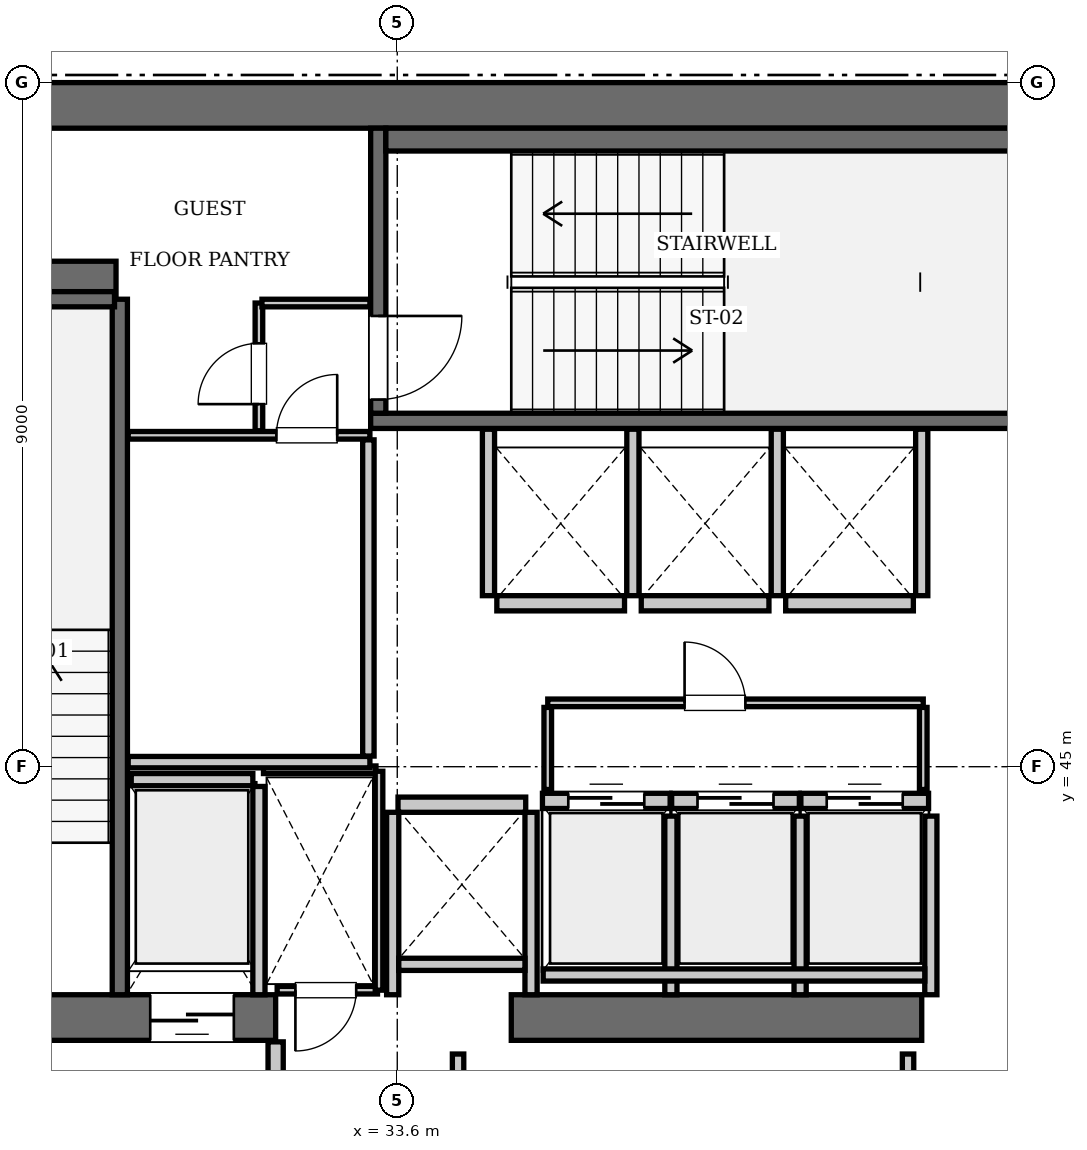
"""IFC4 building model, lengths in metres.
Left out: names, types, materials, properties, quantities, classifications, styles, units other than length and angle.
Written with IfcOpenShell. Run it as: python <this file> out.ifc"""

import sys

from ifc_helpers import new_model, si_unit, direction, frame, frame_2d, origin, place, context, subcontext, project, spatial, rectangle, extrude, element, fill, save


model = new_model("IFC4")
c1 = context("Model", 3, precision=1e-05, world=origin(), true_north=direction((0.0, 1.0)))
c2 = subcontext(c1, "Body", "Model", "MODEL_VIEW")
j1 = project(units=[si_unit("LENGTHUNIT", "METRE"), si_unit("PLANEANGLEUNIT", "RADIAN")], contexts=[c1])
p1 = place(None, origin())
s1 = spatial("IfcSite", under=j1, at=p1, CompositionType="ELEMENT")
p2 = place(p1, origin())
s2 = spatial("IfcBuilding", under=s1, at=p2, CompositionType="ELEMENT")
p3 = place(p2, frame((0.0, 0.0, 247.1)))
s3 = spatial("IfcBuildingStorey", under=s2, at=p3, CompositionType="ELEMENT", Elevation=247.1)
p4 = place(p3, frame((25.2, 53.7, 0.0), z_axis=(0.0, 0.0, 1.0), x_axis=(1.0, 0.0, 0.0)))
e1 = element("IfcWall", 1, at=p4, inside=s3, PredefinedType="SHEAR", context=c2, shape_type="SweptSolid", body=[
    extrude(rectangle(XDim=25.2, YDim=0.6, at=frame_2d((12.6, 0.0))), origin(), (0.0, 0.0, 1.0), 3.85),
])
p5 = place(p3, frame((25.2, 41.7, 0.0), z_axis=(0.0, 0.0, 1.0), x_axis=(1.0, 0.0, 0.0)))
e2 = element("IfcWall", 2, at=p5, inside=s3, PredefinedType="SHEAR", context=c2, shape_type="SweptSolid", body=[
    extrude(rectangle(XDim=6.8, YDim=0.6, at=frame_2d((3.4, 0.0))), origin(), (0.0, 0.0, 1.0), 3.85),
])
p6 = place(p5, frame((1.65, 0.0, 0.0)))
e3 = element("IfcOpeningElement", 3, at=p6, cuts=e2, PredefinedType="OPENING", context=c2, shape_type="SweptSolid", body=[
    extrude(rectangle(XDim=1.15, YDim=2.15, at=frame_2d((0.575, 1.075))), frame((0.0, 0.31, 0.0), z_axis=(0.0, -1.0, 0.0), x_axis=(1.0, 0.0, 0.0)), (0.0, 0.0, 1.0), 0.62),
])
p7 = place(p5, frame((5.15, 0.0, 0.0)))
e4 = element("IfcOpeningElement", 4, at=p7, cuts=e2, PredefinedType="OPENING", context=c2, shape_type="SweptSolid", body=[
    extrude(rectangle(XDim=1.1, YDim=2.2, at=frame_2d((0.55, 1.1))), frame((0.0, 0.31, 0.0), z_axis=(0.0, -1.0, 0.0), x_axis=(1.0, 0.0, 0.0)), (0.0, 0.0, 1.0), 0.62),
])
p8 = place(p3, frame((35.1, 41.7, 0.0), z_axis=(0.0, 0.0, 1.0), x_axis=(1.0, 0.0, 0.0)))
e5 = element("IfcWall", 5, at=p8, inside=s3, PredefinedType="SHEAR", context=c2, shape_type="SweptSolid", body=[
    extrude(rectangle(XDim=5.4, YDim=0.6, at=frame_2d((2.7, 0.0))), origin(), (0.0, 0.0, 1.0), 3.85),
])
p9 = place(p3, frame((25.8, 51.4, 0.0), z_axis=(0.0, 0.0, 1.0), x_axis=(1.0, 0.0, 0.0)))
e6 = element("IfcWall", 6, at=p9, inside=s3, PredefinedType="SHEAR", context=c2, shape_type="SweptSolid", body=[
    extrude(rectangle(XDim=4.1, YDim=0.5, at=frame_2d((2.05, 0.0))), origin(), (0.0, 0.0, 1.0), 3.85),
])
p10 = place(p3, frame((29.95, 42.0, 0.0), z_axis=(0.0, 0.0, 1.0), x_axis=(0.0, 1.0, 0.0)))
e7 = element("IfcWall", 7, at=p10, inside=s3, PredefinedType="SOLIDWALL", context=c2, shape_type="SweptSolid", body=[
    extrude(rectangle(XDim=9.15, YDim=0.2, at=frame_2d((4.575, 0.0))), origin(), (0.0, 0.0, 1.0), 3.61),
])
p11 = place(p3, frame((26.38, 51.15, 0.0), z_axis=(0.0, 0.0, 1.0), x_axis=(1.0, 0.0, 0.0)))
e8 = element("IfcWall", 8, at=p11, inside=s3, PredefinedType="SOLIDWALL", context=c2, shape_type="SweptSolid", body=[
    extrude(rectangle(XDim=3.5, YDim=0.2, at=frame_2d((1.75, 0.0))), origin(), (0.0, 0.0, 1.0), 3.61),
])
p12 = place(p3, frame((33.25, 49.55, 0.0), z_axis=(0.0, 0.0, 1.0), x_axis=(1.0, 0.0, 0.0)))
e9 = element("IfcWall", 9, at=p12, inside=s3, PredefinedType="SOLIDWALL", context=c2, shape_type="SweptSolid", body=[
    extrude(rectangle(XDim=9.1, YDim=0.2, at=frame_2d((4.55, 0.0))), origin(), (0.0, 0.0, 1.0), 3.61),
])
p13 = place(p3, frame((33.35, 49.65, 0.0), z_axis=(0.0, 0.0, 1.0), x_axis=(0.0, 1.0, 0.0)))
e10 = element("IfcWall", 10, at=p13, inside=s3, PredefinedType="SOLIDWALL", context=c2, shape_type="SweptSolid", body=[
    extrude(rectangle(XDim=3.75, YDim=0.2, at=frame_2d((1.875, 0.0))), origin(), (0.0, 0.0, 1.0), 3.61),
])
p14 = place(p13, frame((0.18, 0.0, 0.0)))
e11 = element("IfcOpeningElement", 11, at=p14, cuts=e10, PredefinedType="OPENING", context=c2, shape_type="SweptSolid", body=[
    extrude(rectangle(XDim=1.1, YDim=2.15, at=frame_2d((0.55, 1.075))), frame((0.0, 0.11, 0.0), z_axis=(0.0, -1.0, 0.0), x_axis=(1.0, 0.0, 0.0)), (0.0, 0.0, 1.0), 0.22),
])
p15 = place(p3, frame((33.45, 53.25, 0.0), z_axis=(0.0, 0.0, 1.0), x_axis=(1.0, 0.0, 0.0)))
e12 = element("IfcWall", 12, at=p15, inside=s3, PredefinedType="SOLIDWALL", context=c2, shape_type="SweptSolid", body=[
    extrude(rectangle(XDim=8.7, YDim=0.3, at=frame_2d((4.35, 0.0))), origin(), (0.0, 0.0, 1.0), 3.61),
])
p16 = place(p3, frame((35.51, 44.55, 0.0), z_axis=(0.0, 0.0, 1.0), x_axis=(1.0, 0.0, 0.0)))
e13 = element("IfcWall", 13, at=p16, inside=s3, PredefinedType="SOLIDWALL", context=c2, shape_type="SweptSolid", body=[
    extrude(rectangle(XDim=1.68, YDim=0.2, at=frame_2d((0.84, 0.0))), origin(), (0.0, 0.0, 1.0), 3.61),
])
p17 = place(p16, frame((0.34, 0.0, 0.0)))
e14 = element("IfcOpeningElement", 14, at=p17, cuts=e13, PredefinedType="OPENING", context=c2, shape_type="SweptSolid", body=[
    extrude(rectangle(XDim=1.0, YDim=2.15, at=frame_2d((0.5, 1.075))), frame((0.0, 0.11, 0.0), z_axis=(0.0, -1.0, 0.0), x_axis=(1.0, 0.0, 0.0)), (0.0, 0.0, 1.0), 0.22),
])
p18 = place(p3, frame((37.21, 44.55, 0.0), z_axis=(0.0, 0.0, 1.0), x_axis=(1.0, 0.0, 0.0)))
e15 = element("IfcWall", 15, at=p18, inside=s3, PredefinedType="SOLIDWALL", context=c2, shape_type="SweptSolid", body=[
    extrude(rectangle(XDim=1.68, YDim=0.2, at=frame_2d((0.84, 0.0))), origin(), (0.0, 0.0, 1.0), 3.61),
])
p19 = place(p18, frame((0.34, 0.0, 0.0)))
e16 = element("IfcOpeningElement", 16, at=p19, cuts=e15, PredefinedType="OPENING", context=c2, shape_type="SweptSolid", body=[
    extrude(rectangle(XDim=1.0, YDim=2.15, at=frame_2d((0.5, 1.075))), frame((0.0, 0.11, 0.0), z_axis=(0.0, -1.0, 0.0), x_axis=(1.0, 0.0, 0.0)), (0.0, 0.0, 1.0), 0.22),
])
p20 = place(p3, frame((38.91, 44.55, 0.0), z_axis=(0.0, 0.0, 1.0), x_axis=(1.0, 0.0, 0.0)))
e17 = element("IfcWall", 17, at=p20, inside=s3, PredefinedType="SOLIDWALL", context=c2, shape_type="SweptSolid", body=[
    extrude(rectangle(XDim=1.68, YDim=0.2, at=frame_2d((0.84, 0.0))), origin(), (0.0, 0.0, 1.0), 3.61),
])
p21 = place(p20, frame((0.34, 0.0, 0.0)))
e18 = element("IfcOpeningElement", 18, at=p21, cuts=e17, PredefinedType="OPENING", context=c2, shape_type="SweptSolid", body=[
    extrude(rectangle(XDim=1.0, YDim=2.15, at=frame_2d((0.5, 1.075))), frame((0.0, 0.11, 0.0), z_axis=(0.0, -1.0, 0.0), x_axis=(1.0, 0.0, 0.0)), (0.0, 0.0, 1.0), 0.22),
])
p22 = place(p3, frame((34.91, 47.15, 0.0), z_axis=(0.0, 0.0, 1.0), x_axis=(1.0, 0.0, 0.0)))
e19 = element("IfcWall", 19, at=p22, inside=s3, PredefinedType="SOLIDWALL", context=c2, shape_type="SweptSolid", body=[
    extrude(rectangle(XDim=1.68, YDim=0.2, at=frame_2d((0.84, 0.0))), origin(), (0.0, 0.0, 1.0), 3.61),
])
for number, where, z_axis, x_axis in (
    (20, (36.81, 47.15, 0.0), (0.0, 0.0, 1.0), (1.0, 0.0, 0.0)),
    (21, (38.71, 47.15, 0.0), (0.0, 0.0, 1.0), (1.0, 0.0, 0.0)),
    (22, (33.61, 44.5, 0.0), (0.0, 0.0, 1.0), (1.0, 0.0, 0.0)),
):
    element("IfcWall", number, at=place(p3, frame(where, z_axis=z_axis, x_axis=x_axis)), inside=s3, PredefinedType="SOLIDWALL", context=c2, shape_type="SweptSolid", body=[
        extrude(rectangle(XDim=1.68, YDim=0.2, at=frame_2d((0.84, 0.0))), origin(), (0.0, 0.0, 1.0), 3.61),
    ])
p23 = place(p3, frame((30.1, 44.83, 0.0), z_axis=(0.0, 0.0, 1.0), x_axis=(1.0, 0.0, 0.0)))
e23 = element("IfcWall", 23, at=p23, inside=s3, PredefinedType="SOLIDWALL", context=c2, shape_type="SweptSolid", body=[
    extrude(rectangle(XDim=1.6, YDim=0.16, at=frame_2d((0.8, 0.0))), origin(), (0.0, 0.0, 1.0), 3.61),
])
p24 = place(p3, frame((31.78, 42.0, 0.0), z_axis=(0.0, 0.0, 1.0), x_axis=(0.0, 1.0, 0.0)))
e24 = element("IfcWall", 24, at=p24, inside=s3, PredefinedType="SOLIDWALL", context=c2, shape_type="SweptSolid", body=[
    extrude(rectangle(XDim=2.74, YDim=0.16, at=frame_2d((1.37, 0.0))), origin(), (0.0, 0.0, 1.0), 3.61),
])
for number, where, z_axis, x_axis in (
    (25, (37.2, 42.0, 0.0), (0.0, 0.0, 1.0), (0.0, 1.0, 0.0)),
    (26, (38.9, 42.0, 0.0), (0.0, 0.0, 1.0), (0.0, 1.0, 0.0)),
    (27, (40.62, 42.0, 0.0), (0.0, 0.0, 1.0), (0.0, 1.0, 0.0)),
):
    element("IfcWall", number, at=place(p3, frame(where, z_axis=z_axis, x_axis=x_axis)), inside=s3, PredefinedType="SOLIDWALL", context=c2, shape_type="SweptSolid", body=[
        extrude(rectangle(XDim=2.35, YDim=0.16, at=frame_2d((1.175, 0.0))), origin(), (0.0, 0.0, 1.0), 3.61),
    ])
p25 = place(p3, frame((35.52, 42.26, 0.0), z_axis=(0.0, 0.0, 1.0), x_axis=(1.0, 0.0, 0.0)))
e28 = element("IfcWall", 28, at=p25, inside=s3, PredefinedType="SOLIDWALL", context=c2, shape_type="SweptSolid", body=[
    extrude(rectangle(XDim=5.02, YDim=0.16, at=frame_2d((2.51, 0.0))), origin(), (0.0, 0.0, 1.0), 3.61),
])
for number, where, z_axis, x_axis in (
    (29, (34.8, 47.25, 0.0), (0.0, 0.0, 1.0), (0.0, 1.0, 0.0)),
    (30, (36.7, 47.25, 0.0), (0.0, 0.0, 1.0), (0.0, 1.0, 0.0)),
    (31, (38.6, 47.25, 0.0), (0.0, 0.0, 1.0), (0.0, 1.0, 0.0)),
    (32, (40.5, 47.25, 0.0), (0.0, 0.0, 1.0), (0.0, 1.0, 0.0)),
):
    element("IfcWall", number, at=place(p3, frame(where, z_axis=z_axis, x_axis=x_axis)), inside=s3, PredefinedType="SOLIDWALL", context=c2, shape_type="SweptSolid", body=[
        extrude(rectangle(XDim=2.19, YDim=0.16, at=frame_2d((1.095, 0.0))), origin(), (0.0, 0.0, 1.0), 3.61),
    ])
for number, where, z_axis, x_axis in (
    (33, (33.54, 42.0, 0.0), (0.0, 0.0, 1.0), (0.0, 1.0, 0.0)),
    (34, (35.36, 42.0, 0.0), (0.0, 0.0, 1.0), (0.0, 1.0, 0.0)),
):
    element("IfcWall", number, at=place(p3, frame(where, z_axis=z_axis, x_axis=x_axis)), inside=s3, PredefinedType="SOLIDWALL", context=c2, shape_type="SweptSolid", body=[
        extrude(rectangle(XDim=2.4, YDim=0.16, at=frame_2d((1.2, 0.0))), origin(), (0.0, 0.0, 1.0), 3.61),
    ])
p26 = place(p3, frame((33.62, 42.4, 0.0), z_axis=(0.0, 0.0, 1.0), x_axis=(1.0, 0.0, 0.0)))
e35 = element("IfcWall", 35, at=p26, inside=s3, PredefinedType="SOLIDWALL", context=c2, shape_type="SweptSolid", body=[
    extrude(rectangle(XDim=1.66, YDim=0.16, at=frame_2d((0.83, 0.0))), origin(), (0.0, 0.0, 1.0), 3.61),
])
p27 = place(p3, frame((32.0, 38.31, 0.0), z_axis=(0.0, 0.0, 1.0), x_axis=(0.0, 1.0, 0.0)))
e36 = element("IfcWall", 36, at=p27, inside=s3, PredefinedType="PARTITIONING", context=c2, shape_type="SweptSolid", body=[
    extrude(rectangle(XDim=3.07, YDim=0.2, at=frame_2d((1.535, 0.0))), origin(), (0.0, 0.0, 1.0), 3.61),
])
p28 = place(p3, frame((32.02, 42.06, 0.0), z_axis=(0.0, 0.0, 1.0), x_axis=(1.0, 0.0, 0.0)))
e37 = element("IfcWall", 37, at=p28, inside=s3, PredefinedType="PARTITIONING", context=c2, shape_type="SweptSolid", body=[
    extrude(rectangle(XDim=1.32, YDim=0.1, at=frame_2d((0.66, 0.0))), origin(), (0.0, 0.0, 1.0), 3.61),
])
p29 = place(p28, frame((0.24, 0.0, 0.0)))
e38 = element("IfcOpeningElement", 38, at=p29, cuts=e37, PredefinedType="OPENING", context=c2, shape_type="SweptSolid", body=[
    extrude(rectangle(XDim=0.8, YDim=2.05, at=frame_2d((0.4, 1.025))), frame((0.0, 0.06, 0.0), z_axis=(0.0, -1.0, 0.0), x_axis=(1.0, 0.0, 0.0)), (0.0, 0.0, 1.0), 0.12),
])
p30 = place(p3, frame((31.84, 44.96, 0.0), z_axis=(0.0, 0.0, 1.0), x_axis=(1.0, 0.0, 0.0)))
e39 = element("IfcWall", 39, at=p30, inside=s3, PredefinedType="PARTITIONING", context=c2, shape_type="SweptSolid", body=[
    extrude(rectangle(XDim=1.48, YDim=0.1, at=frame_2d((0.74, 0.0))), origin(), (0.0, 0.0, 1.0), 3.61),
])
p31 = place(p3, frame((33.36, 42.06, 0.0), z_axis=(0.0, 0.0, 1.0), x_axis=(0.0, 1.0, 0.0)))
e40 = element("IfcWall", 40, at=p31, inside=s3, PredefinedType="PARTITIONING", context=c2, shape_type="SweptSolid", body=[
    extrude(rectangle(XDim=2.88, YDim=0.1, at=frame_2d((1.44, 0.0))), origin(), (0.0, 0.0, 1.0), 3.61),
])
p32 = place(p3, frame((35.58, 45.84, 0.0), z_axis=(0.0, 0.0, 1.0), x_axis=(1.0, 0.0, 0.0)))
e41 = element("IfcWall", 41, at=p32, inside=s3, PredefinedType="PARTITIONING", context=c2, shape_type="SweptSolid", body=[
    extrude(rectangle(XDim=4.94, YDim=0.1, at=frame_2d((2.47, 0.0))), origin(), (0.0, 0.0, 1.0), 3.61),
])
p33 = place(p32, frame((1.8, 0.0, 0.0)))
e42 = element("IfcOpeningElement", 42, at=p33, cuts=e41, PredefinedType="OPENING", context=c2, shape_type="SweptSolid", body=[
    extrude(rectangle(XDim=0.8, YDim=2.05, at=frame_2d((0.4, 1.025))), frame((0.0, 0.06, 0.0), z_axis=(0.0, -1.0, 0.0), x_axis=(1.0, 0.0, 0.0)), (0.0, 0.0, 1.0), 0.12),
])
for number, where, z_axis, x_axis in (
    (43, (35.58, 44.7, 0.0), (0.0, 0.0, 1.0), (0.0, 1.0, 0.0)),
    (44, (40.52, 44.7, 0.0), (0.0, 0.0, 1.0), (0.0, 1.0, 0.0)),
):
    element("IfcWall", number, at=place(p3, frame(where, z_axis=z_axis, x_axis=x_axis)), inside=s3, PredefinedType="PARTITIONING", context=c2, shape_type="SweptSolid", body=[
        extrude(rectangle(XDim=1.08, YDim=0.1, at=frame_2d((0.54, 0.0))), origin(), (0.0, 0.0, 1.0), 3.61),
    ])
p34 = place(p3, frame((30.06, 45.06, 0.0), z_axis=(0.0, 0.0, 1.0), x_axis=(1.0, 0.0, 0.0)))
e45 = element("IfcWall", 45, at=p34, inside=s3, PredefinedType="PARTITIONING", context=c2, shape_type="SweptSolid", body=[
    extrude(rectangle(XDim=3.18, YDim=0.15, at=frame_2d((1.59, 0.0))), origin(), (0.0, 0.0, 1.0), 3.61),
])
p35 = place(p3, frame((33.22, 45.14, 0.0), z_axis=(0.0, 0.0, 1.0), x_axis=(0.0, 1.0, 0.0)))
e46 = element("IfcWall", 46, at=p35, inside=s3, PredefinedType="PARTITIONING", context=c2, shape_type="SweptSolid", body=[
    extrude(rectangle(XDim=4.16, YDim=0.15, at=frame_2d((2.08, 0.0))), origin(), (0.0, 0.0, 1.0), 3.61),
])
p36 = place(p3, frame((30.06, 49.36, 0.0), z_axis=(0.0, 0.0, 1.0), x_axis=(1.0, 0.0, 0.0)))
e47 = element("IfcWall", 47, at=p36, inside=s3, PredefinedType="PARTITIONING", context=c2, shape_type="SweptSolid", body=[
    extrude(rectangle(XDim=3.18, YDim=0.1, at=frame_2d((1.59, 0.0))), origin(), (0.0, 0.0, 1.0), 3.61),
])
p37 = place(p36, frame((1.95, 0.0, 0.0)))
e48 = element("IfcOpeningElement", 48, at=p37, cuts=e47, PredefinedType="OPENING", context=c2, shape_type="SweptSolid", body=[
    extrude(rectangle(XDim=0.8, YDim=2.05, at=frame_2d((0.4, 1.025))), frame((0.0, 0.06, 0.0), z_axis=(0.0, -1.0, 0.0), x_axis=(1.0, 0.0, 0.0)), (0.0, 0.0, 1.0), 0.12),
])
p38 = place(p3, frame((31.78, 49.42, 0.0), z_axis=(0.0, 0.0, 1.0), x_axis=(0.0, 1.0, 0.0)))
e49 = element("IfcWall", 49, at=p38, inside=s3, PredefinedType="PARTITIONING", context=c2, shape_type="SweptSolid", body=[
    extrude(rectangle(XDim=1.68, YDim=0.1, at=frame_2d((0.84, 0.0))), origin(), (0.0, 0.0, 1.0), 3.61),
])
p39 = place(p38, frame((0.35, 0.0, 0.0)))
e50 = element("IfcOpeningElement", 50, at=p39, cuts=e49, PredefinedType="OPENING", context=c2, shape_type="SweptSolid", body=[
    extrude(rectangle(XDim=0.8, YDim=2.05, at=frame_2d((0.4, 1.025))), frame((0.0, 0.06, 0.0), z_axis=(0.0, -1.0, 0.0), x_axis=(1.0, 0.0, 0.0)), (0.0, 0.0, 1.0), 0.12),
])
p40 = place(p3, frame((31.82, 51.1, 0.0), z_axis=(0.0, 0.0, 1.0), x_axis=(1.0, 0.0, 0.0)))
e51 = element("IfcWall", 51, at=p40, inside=s3, PredefinedType="PARTITIONING", context=c2, shape_type="SweptSolid", body=[
    extrude(rectangle(XDim=1.42, YDim=0.1, at=frame_2d((0.71, 0.0))), origin(), (0.0, 0.0, 1.0), 3.61),
])
for number, where, z_axis, x_axis in (
    (52, (34.4, 38.38, 0.0), (0.0, 0.0, 1.0), (0.0, 1.0, 0.0)),
    (53, (40.32, 38.38, 0.0), (0.0, 0.0, 1.0), (0.0, 1.0, 0.0)),
):
    element("IfcWall", number, at=place(p3, frame(where, z_axis=z_axis, x_axis=x_axis)), inside=s3, PredefinedType="PARTITIONING", context=c2, shape_type="SweptSolid", body=[
        extrude(rectangle(XDim=2.84, YDim=0.15, at=frame_2d((1.42, 0.0))), origin(), (0.0, 0.0, 1.0), 3.61),
    ])
p41 = place(p14, frame((1.1, 0.0, 0.0), z_axis=(0.0, 0.0, 1.0), x_axis=(-1.0, 0.0, 0.0)))
e54 = element("IfcDoor", 54, at=p41, inside=s3, OperationType="SINGLE_SWING_LEFT", PredefinedType="DOOR", context=c2, shape_type="SweptSolid", body=[
    extrude(rectangle(XDim=1.1, YDim=2.15, at=frame_2d((0.55, 1.075))), frame((0.0, 0.025, 0.0), z_axis=(0.0, -1.0, 0.0), x_axis=(1.0, 0.0, 0.0)), (0.0, 0.0, 1.0), 0.05),
])
fill(e11, e54)
p42 = place(p17, origin())
e55 = element("IfcDoor", 55, at=p42, inside=s3, OperationType="SLIDING_TO_LEFT", PredefinedType="DOOR", context=c2, shape_type="SweptSolid", body=[
    extrude(rectangle(XDim=1.0, YDim=2.15, at=frame_2d((0.5, 1.075))), frame((0.0, 0.025, 0.0), z_axis=(0.0, -1.0, 0.0), x_axis=(1.0, 0.0, 0.0)), (0.0, 0.0, 1.0), 0.05),
])
fill(e14, e55)
p43 = place(p19, origin())
e56 = element("IfcDoor", 56, at=p43, inside=s3, OperationType="SLIDING_TO_LEFT", PredefinedType="DOOR", context=c2, shape_type="SweptSolid", body=[
    extrude(rectangle(XDim=1.0, YDim=2.15, at=frame_2d((0.5, 1.075))), frame((0.0, 0.025, 0.0), z_axis=(0.0, -1.0, 0.0), x_axis=(1.0, 0.0, 0.0)), (0.0, 0.0, 1.0), 0.05),
])
fill(e16, e56)
p44 = place(p21, origin())
e57 = element("IfcDoor", 57, at=p44, inside=s3, OperationType="SLIDING_TO_LEFT", PredefinedType="DOOR", context=c2, shape_type="SweptSolid", body=[
    extrude(rectangle(XDim=1.0, YDim=2.15, at=frame_2d((0.5, 1.075))), frame((0.0, 0.025, 0.0), z_axis=(0.0, -1.0, 0.0), x_axis=(1.0, 0.0, 0.0)), (0.0, 0.0, 1.0), 0.05),
])
fill(e18, e57)
p45 = place(p7, frame((1.1, 0.0, 0.0), z_axis=(0.0, 0.0, 1.0), x_axis=(-1.0, 0.0, 0.0)))
e58 = element("IfcDoor", 58, at=p45, inside=s3, OperationType="SLIDING_TO_LEFT", PredefinedType="DOOR", context=c2, shape_type="SweptSolid", body=[
    extrude(rectangle(XDim=1.1, YDim=2.2, at=frame_2d((0.55, 1.1))), frame((0.0, 0.025, 0.0), z_axis=(0.0, -1.0, 0.0), x_axis=(1.0, 0.0, 0.0)), (0.0, 0.0, 1.0), 0.05),
])
fill(e4, e58)
p46 = place(p29, frame((0.8, 0.0, 0.0), z_axis=(0.0, 0.0, 1.0), x_axis=(-1.0, 0.0, 0.0)))
e59 = element("IfcDoor", 59, at=p46, inside=s3, OperationType="SINGLE_SWING_RIGHT", PredefinedType="DOOR", context=c2, shape_type="SweptSolid", body=[
    extrude(rectangle(XDim=0.8, YDim=2.05, at=frame_2d((0.4, 1.025))), frame((0.0, 0.025, 0.0), z_axis=(0.0, -1.0, 0.0), x_axis=(1.0, 0.0, 0.0)), (0.0, 0.0, 1.0), 0.05),
])
fill(e38, e59)
p47 = place(p33, origin())
e60 = element("IfcDoor", 60, at=p47, inside=s3, OperationType="SINGLE_SWING_LEFT", PredefinedType="DOOR", context=c2, shape_type="SweptSolid", body=[
    extrude(rectangle(XDim=0.8, YDim=2.05, at=frame_2d((0.4, 1.025))), frame((0.0, 0.025, 0.0), z_axis=(0.0, -1.0, 0.0), x_axis=(1.0, 0.0, 0.0)), (0.0, 0.0, 1.0), 0.05),
])
fill(e42, e60)
p48 = place(p37, origin())
e61 = element("IfcDoor", 61, at=p48, inside=s3, OperationType="SINGLE_SWING_RIGHT", PredefinedType="DOOR", context=c2, shape_type="SweptSolid", body=[
    extrude(rectangle(XDim=0.8, YDim=2.05, at=frame_2d((0.4, 1.025))), frame((0.0, 0.025, 0.0), z_axis=(0.0, -1.0, 0.0), x_axis=(1.0, 0.0, 0.0)), (0.0, 0.0, 1.0), 0.05),
])
fill(e48, e61)
p49 = place(p39, origin())
e62 = element("IfcDoor", 62, at=p49, inside=s3, OperationType="SINGLE_SWING_LEFT", PredefinedType="DOOR", context=c2, shape_type="SweptSolid", body=[
    extrude(rectangle(XDim=0.8, YDim=2.05, at=frame_2d((0.4, 1.025))), frame((0.0, 0.025, 0.0), z_axis=(0.0, -1.0, 0.0), x_axis=(1.0, 0.0, 0.0)), (0.0, 0.0, 1.0), 0.05),
])
fill(e50, e62)
save(model, sys.argv[1])
